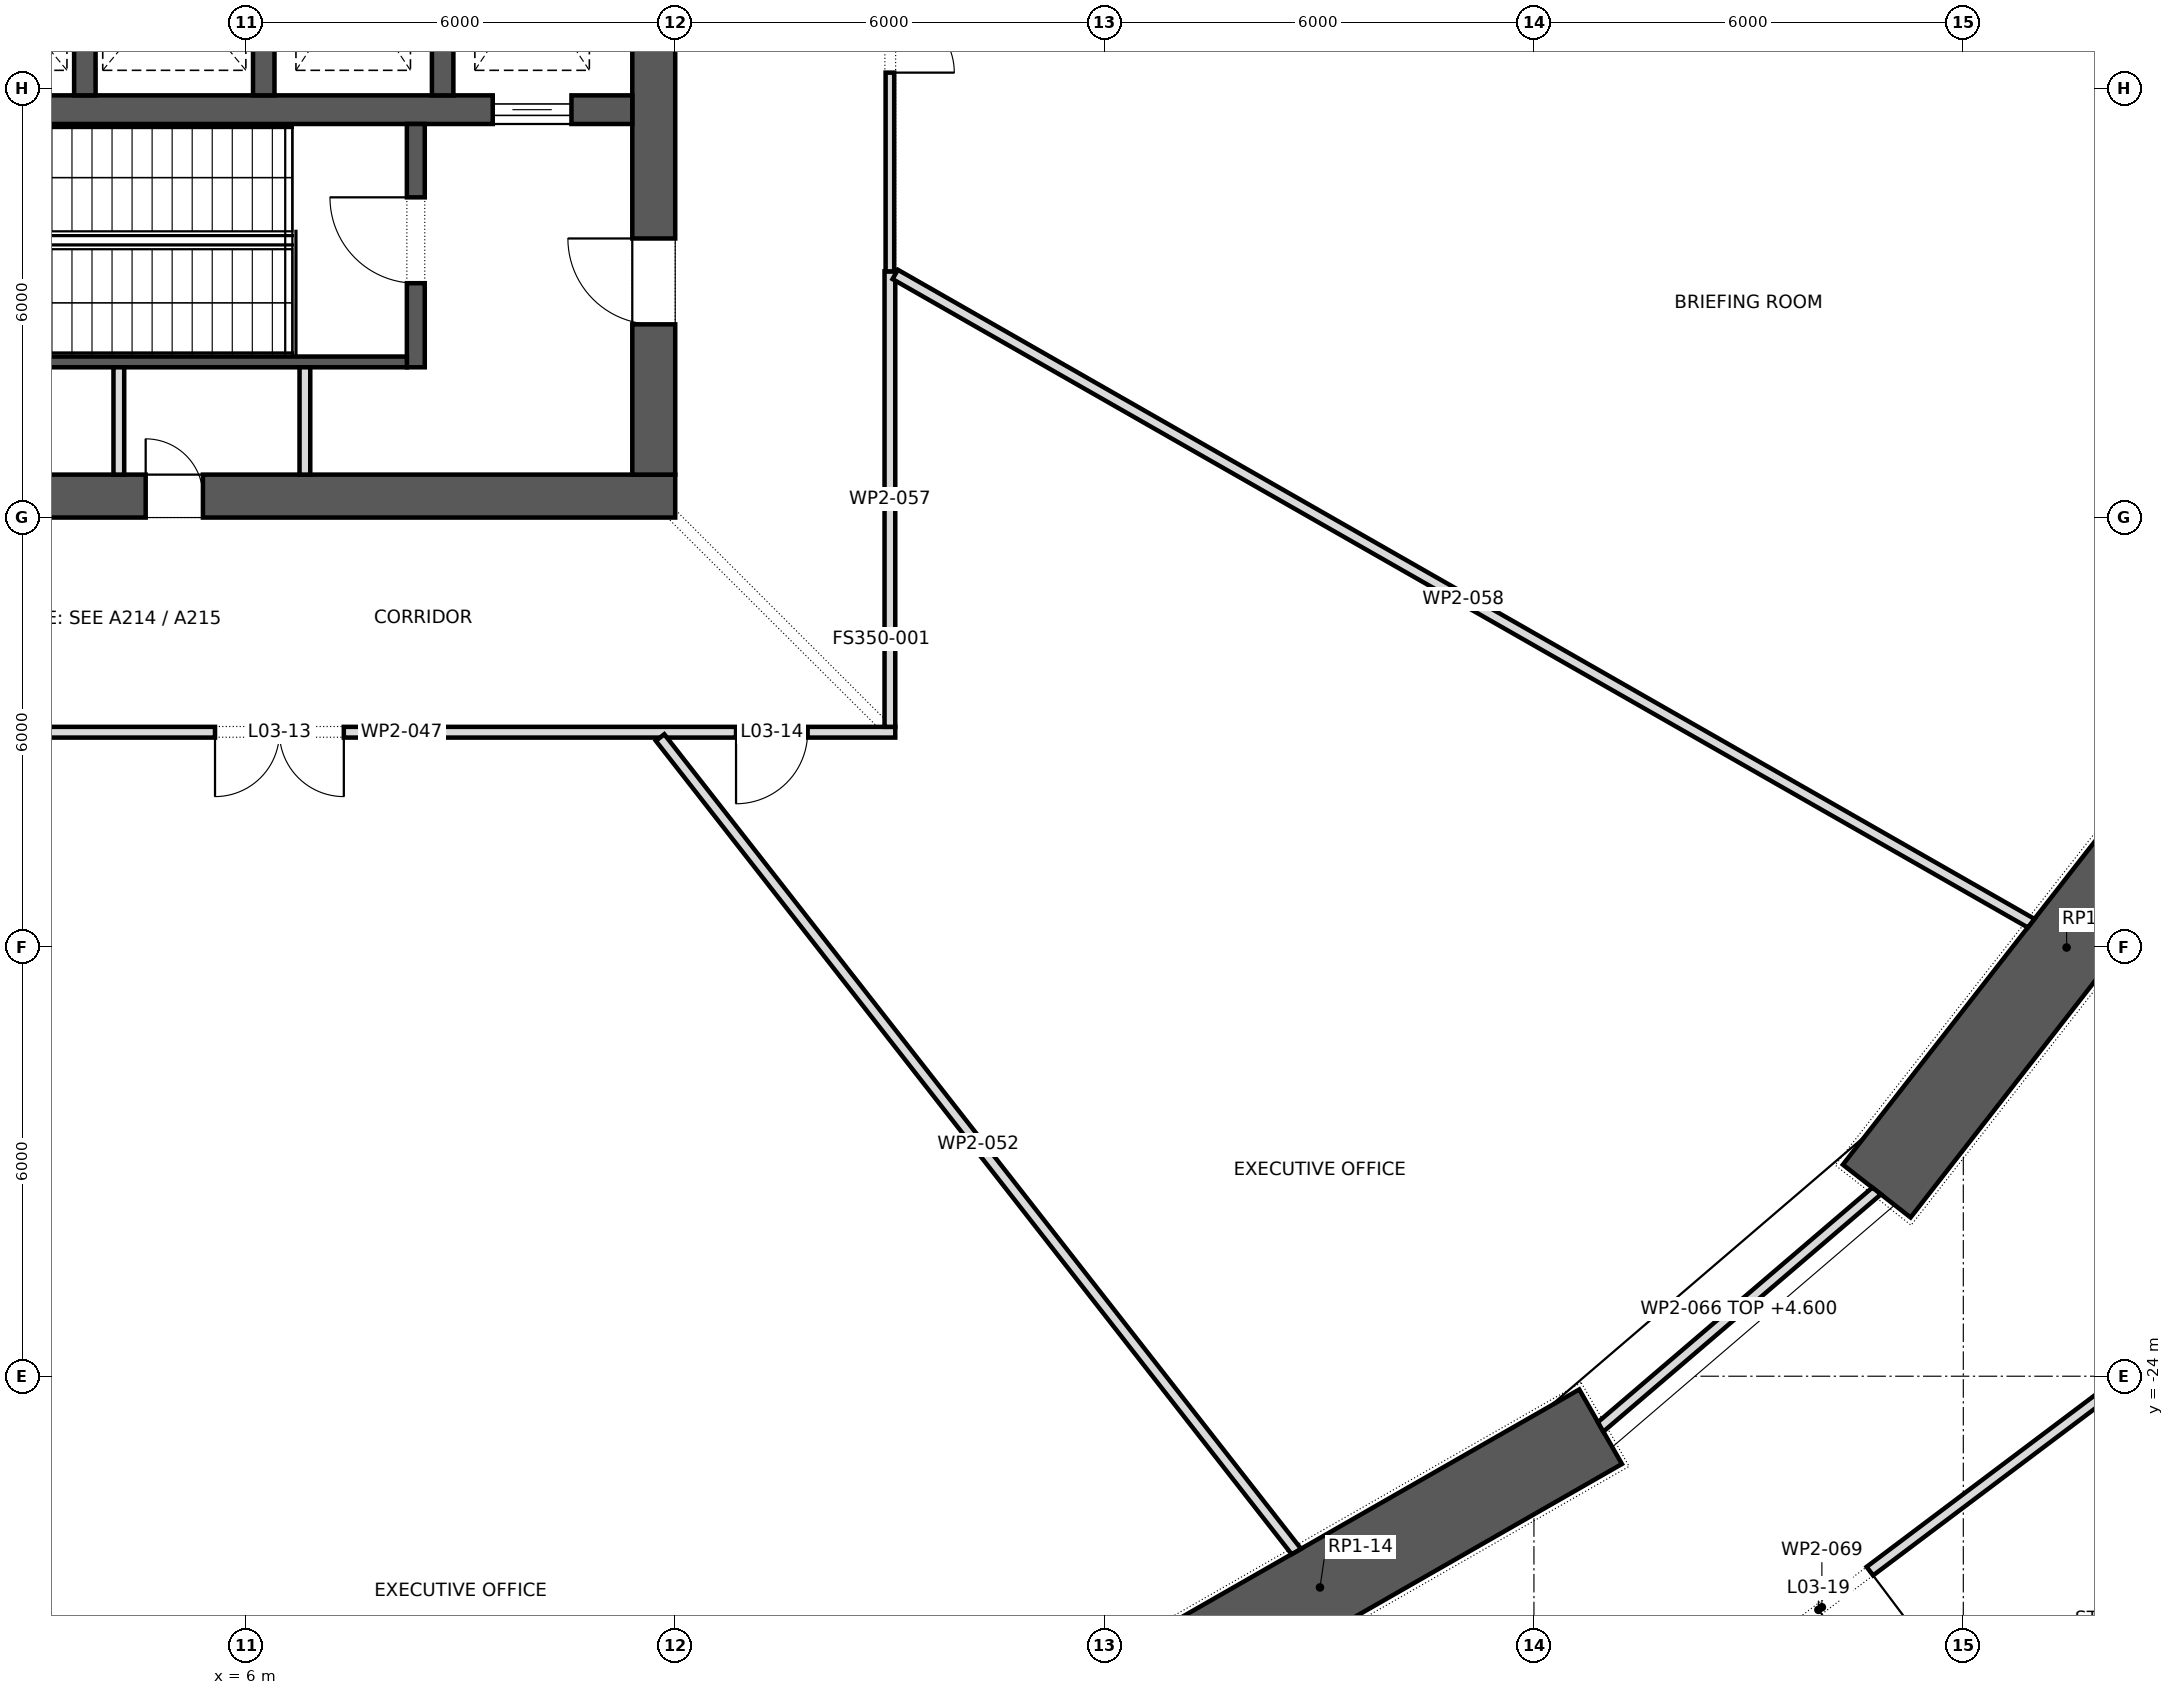
"""IFC4 building model, lengths in metres.
Left out: names, types, materials, properties, quantities, classifications, styles, units other than length and angle.
Written with IfcOpenShell. Run it as: python <this file> out.ifc"""

import sys

from ifc_helpers import new_model, si_unit, direction, frame, frame_2d, origin, place, context, subcontext, project, spatial, polyline, rectangle, outline, extrude, element, fill, save


model = new_model("IFC4")
c1 = context("Model", 3, precision=1e-05, world=origin(), true_north=direction((0.0, 1.0)))
c2 = subcontext(c1, "Body", "Model", "MODEL_VIEW")
j1 = project(units=[si_unit("LENGTHUNIT", "METRE"), si_unit("PLANEANGLEUNIT", "RADIAN")], contexts=[c1])
p1 = place(None, origin())
s1 = spatial("IfcSite", under=j1, at=p1, CompositionType="ELEMENT")
p2 = place(p1, origin())
s2 = spatial("IfcBuilding", under=s1, at=p2, CompositionType="ELEMENT")
p3 = place(p2, frame((0.0, 0.0, 18.0)))
s3 = spatial("IfcBuildingStorey", under=s2, at=p3, CompositionType="ELEMENT", Elevation=18.0)
p4 = place(p3, frame((17.089, -29.198, 0.0), z_axis=(0.0, 0.0, 1.0), x_axis=(0.867760656864, 0.496982336103, 0.0)))
e1 = element("IfcWall", 1, at=p4, inside=s3, PredefinedType="SHEAR", context=c2, shape_type="SweptSolid", body=[
    extrude(rectangle(XDim=9.038, YDim=1.2, at=frame_2d((4.519, 0.0))), origin(), (0.0, 0.0, 1.0), 5.5),
])
p5 = place(p3, frame((28.79, -21.412, 0.0), z_axis=(0.0, 0.0, 1.0), x_axis=(0.614825322247, 0.788663314174, 0.0)))
e2 = element("IfcWall", 2, at=p5, inside=s3, PredefinedType="SHEAR", context=c2, shape_type="SweptSolid", body=[
    extrude(rectangle(XDim=8.632, YDim=1.2, at=frame_2d((4.316, 0.0))), origin(), (0.0, 0.0, 1.0), 5.5),
])
p6 = place(p3, frame((-12.0, -11.7, 0.0), z_axis=(0.0, 0.0, 1.0), x_axis=(1.0, 0.0, 0.0)))
e3 = element("IfcWall", 3, at=p6, inside=s3, PredefinedType="SHEAR", context=c2, shape_type="SweptSolid", body=[
    extrude(rectangle(XDim=24.0, YDim=0.6, at=frame_2d((12.0, 0.0))), origin(), (0.0, 0.0, 1.0), 5.5),
])
p7 = place(p6, frame((9.275, 0.0, 0.0)))
e4 = element("IfcOpeningElement", 4, at=p7, cuts=e3, PredefinedType="OPENING", context=c2, shape_type="SweptSolid", body=[
    extrude(rectangle(XDim=0.9, YDim=2.1, at=frame_2d((0.45, 1.05))), frame((0.0, 0.312, 0.0), z_axis=(0.0, -1.0, 0.0), x_axis=(1.0, 0.0, 0.0)), (0.0, 0.0, 1.0), 0.624),
])
p8 = place(p6, frame((10.925, 0.0, 0.0)))
e5 = element("IfcOpeningElement", 5, at=p8, cuts=e3, PredefinedType="OPENING", context=c2, shape_type="SweptSolid", body=[
    extrude(rectangle(XDim=0.9, YDim=2.1, at=frame_2d((0.45, 1.05))), frame((0.0, 0.312, 0.0), z_axis=(0.0, -1.0, 0.0), x_axis=(1.0, 0.0, 0.0)), (0.0, 0.0, 1.0), 0.624),
])
p9 = place(p6, frame((4.2, 0.0, 0.0)))
e6 = element("IfcOpeningElement", 6, at=p9, cuts=e3, PredefinedType="OPENING", context=c2, shape_type="SweptSolid", body=[
    extrude(rectangle(XDim=0.8, YDim=2.1, at=frame_2d((0.4, 1.05))), frame((0.0, 0.312, 0.0), z_axis=(0.0, -1.0, 0.0), x_axis=(1.0, 0.0, 0.0)), (0.0, 0.0, 1.0), 0.624),
])
p10 = place(p6, frame((6.8, 0.0, 0.0)))
e7 = element("IfcOpeningElement", 7, at=p10, cuts=e3, PredefinedType="OPENING", context=c2, shape_type="SweptSolid", body=[
    extrude(rectangle(XDim=0.8, YDim=2.1, at=frame_2d((0.4, 1.05))), frame((0.0, 0.312, 0.0), z_axis=(0.0, -1.0, 0.0), x_axis=(1.0, 0.0, 0.0)), (0.0, 0.0, 1.0), 0.624),
])
p11 = place(p6, frame((13.8, 0.0, 0.0)))
e8 = element("IfcOpeningElement", 8, at=p11, cuts=e3, PredefinedType="OPENING", context=c2, shape_type="SweptSolid", body=[
    extrude(rectangle(XDim=0.8, YDim=2.1, at=frame_2d((0.4, 1.05))), frame((0.0, 0.312, 0.0), z_axis=(0.0, -1.0, 0.0), x_axis=(1.0, 0.0, 0.0)), (0.0, 0.0, 1.0), 0.624),
])
p12 = place(p6, frame((16.6, 0.0, 0.0)))
e9 = element("IfcOpeningElement", 9, at=p12, cuts=e3, PredefinedType="OPENING", context=c2, shape_type="SweptSolid", body=[
    extrude(rectangle(XDim=0.8, YDim=2.1, at=frame_2d((0.4, 1.05))), frame((0.0, 0.312, 0.0), z_axis=(0.0, -1.0, 0.0), x_axis=(1.0, 0.0, 0.0)), (0.0, 0.0, 1.0), 0.624),
])
p13 = place(p3, frame((11.7, -11.4, 0.0), z_axis=(0.0, 0.0, 1.0), x_axis=(0.0, 1.0, 0.0)))
e10 = element("IfcWall", 10, at=p13, inside=s3, PredefinedType="SHEAR", context=c2, shape_type="SweptSolid", body=[
    extrude(rectangle(XDim=22.8, YDim=0.6, at=frame_2d((11.4, 0.0))), origin(), (0.0, 0.0, 1.0), 5.5),
])
p14 = place(p13, frame((10.2, 0.0, 0.0)))
e11 = element("IfcOpeningElement", 11, at=p14, cuts=e10, PredefinedType="OPENING", context=c2, shape_type="SweptSolid", body=[
    extrude(rectangle(XDim=2.4, YDim=2.1, at=frame_2d((1.2, 1.05))), frame((0.0, 0.312, 0.0), z_axis=(0.0, -1.0, 0.0), x_axis=(1.0, 0.0, 0.0)), (0.0, 0.0, 1.0), 0.624),
])
p15 = place(p13, frame((19.5, 0.0, 0.0)))
e12 = element("IfcOpeningElement", 12, at=p15, cuts=e10, PredefinedType="OPENING", context=c2, shape_type="SweptSolid", body=[
    extrude(rectangle(XDim=1.2, YDim=2.1, at=frame_2d((0.6, 1.05))), frame((0.0, 0.312, 0.0), z_axis=(0.0, -1.0, 0.0), x_axis=(1.0, 0.0, 0.0)), (0.0, 0.0, 1.0), 0.624),
])
p16 = place(p13, frame((2.1, 0.0, 0.0)))
e13 = element("IfcOpeningElement", 13, at=p16, cuts=e10, PredefinedType="OPENING", context=c2, shape_type="SweptSolid", body=[
    extrude(rectangle(XDim=1.2, YDim=2.1, at=frame_2d((0.6, 1.05))), frame((0.0, 0.312, 0.0), z_axis=(0.0, -1.0, 0.0), x_axis=(1.0, 0.0, 0.0)), (0.0, 0.0, 1.0), 0.624),
])
p17 = place(p3, frame((-11.4, -6.3, 0.0), z_axis=(0.0, 0.0, 1.0), x_axis=(1.0, 0.0, 0.0)))
e14 = element("IfcWall", 14, at=p17, inside=s3, PredefinedType="SHEAR", context=c2, shape_type="SweptSolid", body=[
    extrude(rectangle(XDim=22.8, YDim=0.4, at=frame_2d((11.4, 0.0))), origin(), (0.0, 0.0, 1.0), 5.5),
])
p18 = place(p17, frame((20.85, 0.0, 0.0)))
e15 = element("IfcOpeningElement", 15, at=p18, cuts=e14, PredefinedType="OPENING", context=c2, shape_type="SweptSolid", body=[
    extrude(rectangle(XDim=1.1, YDim=2.1, at=frame_2d((0.55, 1.05))), frame((0.0, 0.212, 0.0), z_axis=(0.0, -1.0, 0.0), x_axis=(1.0, 0.0, 0.0)), (0.0, 0.0, 1.0), 0.424),
])
for number, where, z_axis, x_axis in (
    (16, (3.75, -6.1, 0.0), (0.0, 0.0, 1.0), (0.0, 1.0, 0.0)),
    (17, (6.25, -6.1, 0.0), (0.0, 0.0, 1.0), (0.0, 1.0, 0.0)),
    (18, (8.75, -6.1, 0.0), (0.0, 0.0, 1.0), (0.0, 1.0, 0.0)),
):
    element("IfcWall", number, at=place(p3, frame(where, z_axis=z_axis, x_axis=x_axis)), inside=s3, PredefinedType="SHEAR", context=c2, shape_type="SweptSolid", body=[
        extrude(rectangle(XDim=2.9, YDim=0.3, at=frame_2d((1.45, 0.0))), origin(), (0.0, 0.0, 1.0), 5.5),
    ])
p19 = place(p3, frame((8.375, -9.9, 0.0), z_axis=(0.0, 0.0, 1.0), x_axis=(0.0, 1.0, 0.0)))
e19 = element("IfcWall", 19, at=p19, inside=s3, PredefinedType="SHEAR", context=c2, shape_type="SweptSolid", body=[
    extrude(rectangle(XDim=3.4, YDim=0.25, at=frame_2d((1.7, 0.0))), origin(), (0.0, 0.0, 1.0), 5.2),
])
p20 = place(p19, frame((1.175, 0.0, 0.0)))
e20 = element("IfcOpeningElement", 20, at=p20, cuts=e19, PredefinedType="OPENING", context=c2, shape_type="SweptSolid", body=[
    extrude(rectangle(XDim=1.2, YDim=2.1, at=frame_2d((0.6, 1.05))), frame((0.0, 0.137, 0.0), z_axis=(0.0, -1.0, 0.0), x_axis=(1.0, 0.0, 0.0)), (0.0, 0.0, 1.0), 0.274),
])
p21 = place(p3, frame((0.25, -9.825, 0.0), z_axis=(0.0, 0.0, 1.0), x_axis=(1.0, 0.0, 0.0)))
e21 = element("IfcWall", 21, at=p21, inside=s3, PredefinedType="SHEAR", context=c2, shape_type="SweptSolid", body=[
    extrude(rectangle(XDim=8.0, YDim=0.15, at=frame_2d((4.0, 0.0))), origin(), (0.0, 0.0, 1.0), 5.2),
])
for number, where, z_axis, x_axis in (
    (22, (4.225, -11.4, 0.0), (0.0, 0.0, 1.0), (0.0, 1.0, 0.0)),
    (23, (6.825, -11.4, 0.0), (0.0, 0.0, 1.0), (0.0, 1.0, 0.0)),
):
    element("IfcWall", number, at=place(p3, frame(where, z_axis=z_axis, x_axis=x_axis)), inside=s3, PredefinedType="PARTITIONING", context=c2, shape_type="SweptSolid", body=[
        extrude(rectangle(XDim=1.5, YDim=0.15, at=frame_2d((0.75, 0.0))), origin(), (0.0, 0.0, 1.0), 5.2),
    ])
p22 = place(p3, frame((1.275, -15.0, 0.0), z_axis=(0.0, 0.0, 1.0), x_axis=(1.0, 0.0, 0.0)))
e24 = element("IfcWall", 24, at=p22, inside=s3, PredefinedType="PARTITIONING", context=c2, shape_type="SweptSolid", body=[
    extrude(rectangle(XDim=13.8, YDim=0.15, at=frame_2d((6.9, 0.0))), origin(), (0.0, 0.0, 1.0), 5.2),
])
p23 = place(p22, frame((4.294, 0.0, 0.0)))
e25 = element("IfcOpeningElement", 25, at=p23, cuts=e24, PredefinedType="OPENING", context=c2, shape_type="SweptSolid", body=[
    extrude(rectangle(XDim=1.8, YDim=2.1, at=frame_2d((0.9, 1.05))), frame((0.0, 0.087, 0.0), z_axis=(0.0, -1.0, 0.0), x_axis=(1.0, 0.0, 0.0)), (0.0, 0.0, 1.0), 0.174),
])
p24 = place(p22, frame((11.575, 0.0, 0.0)))
e26 = element("IfcOpeningElement", 26, at=p24, cuts=e24, PredefinedType="OPENING", context=c2, shape_type="SweptSolid", body=[
    extrude(rectangle(XDim=1.0, YDim=2.1, at=frame_2d((0.5, 1.05))), frame((0.0, 0.087, 0.0), z_axis=(0.0, -1.0, 0.0), x_axis=(1.0, 0.0, 0.0)), (0.0, 0.0, 1.0), 0.174),
])
p25 = place(p3, frame((11.788, -15.074, 0.0), z_axis=(0.0, 0.0, 1.0), x_axis=(0.615848120598, -0.787864894735, 0.0)))
e27 = element("IfcWall", 27, at=p25, inside=s3, PredefinedType="PARTITIONING", context=c2, shape_type="SweptSolid", body=[
    extrude(outline(polyline([(0.0, -0.075), (14.428, -0.075), (14.449, 0.075), (0.0, 0.075), (0.0, -0.075)])), origin(), (0.0, 0.0, 1.0), 5.2),
])
p26 = place(p3, frame((15.0, -8.559, 0.0), z_axis=(0.0, 0.0, 1.0), x_axis=(0.0, -1.0, 0.0)))
e28 = element("IfcWall", 28, at=p26, inside=s3, PredefinedType="PARTITIONING", context=c2, shape_type="SweptSolid", body=[
    extrude(rectangle(XDim=6.366, YDim=0.15, at=frame_2d((3.183, 0.0))), origin(), (0.0, 0.0, 1.0), 5.2),
])
p27 = place(p3, frame((15.074, -8.602, 0.0), z_axis=(0.0, 0.0, 1.0), x_axis=(0.868343386691, -0.495963469209, 0.0)))
e29 = element("IfcWall", 29, at=p27, inside=s3, PredefinedType="PARTITIONING", context=c2, shape_type="SweptSolid", body=[
    extrude(outline(polyline([(0.0, -0.075), (18.271, -0.075), (18.292, 0.075), (0.0, 0.075), (0.0, -0.075)])), origin(), (0.0, 0.0, 1.0), 5.2),
])
p28 = place(p3, frame((15.0, -1.14, 0.0), z_axis=(0.0, 0.0, 1.0), x_axis=(0.0, -1.0, 0.0)))
e30 = element("IfcWall", 30, at=p28, inside=s3, PredefinedType="PARTITIONING", context=c2, shape_type="SweptSolid", body=[
    extrude(rectangle(XDim=7.42, YDim=0.12, at=frame_2d((3.71, 0.0))), origin(), (0.0, 0.0, 1.0), 5.2),
])
p29 = place(p28, frame((2.842, 0.0, 0.0)))
e31 = element("IfcOpeningElement", 31, at=p29, cuts=e30, PredefinedType="OPENING", context=c2, shape_type="SweptSolid", body=[
    extrude(rectangle(XDim=1.8, YDim=2.1, at=frame_2d((0.9, 1.05))), frame((0.0, 0.072, 0.0), z_axis=(0.0, -1.0, 0.0), x_axis=(1.0, 0.0, 0.0)), (0.0, 0.0, 1.0), 0.144),
])
p30 = place(p3, frame((24.932, -24.708, 0.0), z_axis=(0.0, 0.0, 1.0), x_axis=(0.760084552743, 0.649824185978, 0.0)))
e32 = element("IfcWall", 32, at=p30, inside=s3, PredefinedType="PARTITIONING", context=c2, shape_type="SweptSolid", body=[
    extrude(outline(polyline([(-0.014, -0.075), (5.09, -0.075), (5.06, 0.075), (0.014, 0.075), (-0.014, -0.075)])), origin(), (0.0, 0.0, 1.0), 4.6),
])
p31 = place(p3, frame((32.186, -24.098, 0.0), z_axis=(0.0, 0.0, 1.0), x_axis=(-0.799200559321, -0.601064444116, 0.0)))
e33 = element("IfcWall", 33, at=p31, inside=s3, PredefinedType="PARTITIONING", context=c2, shape_type="SweptSolid", body=[
    extrude(rectangle(XDim=10.417, YDim=0.15, at=frame_2d((5.208, 0.0))), origin(), (0.0, 0.0, 1.0), 5.2),
])
p32 = place(p31, frame((4.369, 0.0, 0.0)))
e34 = element("IfcOpeningElement", 34, at=p32, cuts=e33, PredefinedType="OPENING", context=c2, shape_type="SweptSolid", body=[
    extrude(rectangle(XDim=1.8, YDim=2.1, at=frame_2d((0.9, 1.05))), frame((0.0, 0.087, 0.0), z_axis=(0.0, -1.0, 0.0), x_axis=(1.0, 0.0, 0.0)), (0.0, 0.0, 1.0), 0.174),
])
p33 = place(p18, origin())
e35 = element("IfcDoor", 35, at=p33, inside=s3, OperationType="SLIDING_TO_LEFT", PredefinedType="DOOR", context=c2, shape_type="SweptSolid", body=[
    extrude(rectangle(XDim=1.1, YDim=2.1, at=frame_2d((0.55, 1.05))), frame((0.0, 0.025, 0.0), z_axis=(0.0, -1.0, 0.0), x_axis=(1.0, 0.0, 0.0)), (0.0, 0.0, 1.0), 0.05),
])
fill(e15, e35)
p34 = place(p20, origin())
e36 = element("IfcDoor", 36, at=p34, inside=s3, OperationType="SINGLE_SWING_LEFT", PredefinedType="DOOR", context=c2, shape_type="SweptSolid", body=[
    extrude(rectangle(XDim=1.2, YDim=2.1, at=frame_2d((0.6, 1.05))), frame((0.0, 0.025, 0.0), z_axis=(0.0, -1.0, 0.0), x_axis=(1.0, 0.0, 0.0)), (0.0, 0.0, 1.0), 0.05),
])
fill(e20, e36)
p35 = place(p16, origin())
e37 = element("IfcDoor", 37, at=p35, inside=s3, OperationType="SINGLE_SWING_LEFT", PredefinedType="DOOR", context=c2, shape_type="SweptSolid", body=[
    extrude(rectangle(XDim=1.2, YDim=2.1, at=frame_2d((0.6, 1.05))), frame((0.0, 0.025, 0.0), z_axis=(0.0, -1.0, 0.0), x_axis=(1.0, 0.0, 0.0)), (0.0, 0.0, 1.0), 0.05),
])
fill(e13, e37)
p36 = place(p12, origin())
e38 = element("IfcDoor", 38, at=p36, inside=s3, OperationType="SINGLE_SWING_RIGHT", PredefinedType="DOOR", context=c2, shape_type="SweptSolid", body=[
    extrude(rectangle(XDim=0.8, YDim=2.1, at=frame_2d((0.4, 1.05))), frame((0.0, 0.025, 0.0), z_axis=(0.0, -1.0, 0.0), x_axis=(1.0, 0.0, 0.0)), (0.0, 0.0, 1.0), 0.05),
])
fill(e9, e38)
p37 = place(p23, frame((1.8, 0.0, 0.0), z_axis=(0.0, 0.0, 1.0), x_axis=(-1.0, 0.0, 0.0)))
e39 = element("IfcDoor", 39, at=p37, inside=s3, OperationType="DOUBLE_DOOR_SINGLE_SWING", PredefinedType="DOOR", context=c2, shape_type="SweptSolid", body=[
    extrude(rectangle(XDim=1.8, YDim=2.1, at=frame_2d((0.9, 1.05))), frame((0.0, 0.025, 0.0), z_axis=(0.0, -1.0, 0.0), x_axis=(1.0, 0.0, 0.0)), (0.0, 0.0, 1.0), 0.05),
])
fill(e25, e39)
p38 = place(p24, frame((1.0, 0.0, 0.0), z_axis=(0.0, 0.0, 1.0), x_axis=(-1.0, 0.0, 0.0)))
e40 = element("IfcDoor", 40, at=p38, inside=s3, OperationType="SINGLE_SWING_LEFT", PredefinedType="DOOR", context=c2, shape_type="SweptSolid", body=[
    extrude(rectangle(XDim=1.0, YDim=2.1, at=frame_2d((0.5, 1.05))), frame((0.0, 0.025, 0.0), z_axis=(0.0, -1.0, 0.0), x_axis=(1.0, 0.0, 0.0)), (0.0, 0.0, 1.0), 0.05),
])
fill(e26, e40)
p39 = place(p29, origin())
e41 = element("IfcDoor", 41, at=p39, inside=s3, OperationType="DOUBLE_DOOR_SINGLE_SWING", PredefinedType="DOOR", context=c2, shape_type="SweptSolid", body=[
    extrude(rectangle(XDim=1.8, YDim=2.1, at=frame_2d((0.9, 1.05))), frame((0.0, 0.025, 0.0), z_axis=(0.0, -1.0, 0.0), x_axis=(1.0, 0.0, 0.0)), (0.0, 0.0, 1.0), 0.05),
])
fill(e31, e41)
p40 = place(p32, origin())
e42 = element("IfcDoor", 42, at=p40, inside=s3, OperationType="DOUBLE_DOOR_SINGLE_SWING", PredefinedType="DOOR", context=c2, shape_type="SweptSolid", body=[
    extrude(rectangle(XDim=1.8, YDim=2.1, at=frame_2d((0.9, 1.05))), frame((0.0, 0.025, 0.0), z_axis=(0.0, -1.0, 0.0), x_axis=(1.0, 0.0, 0.0)), (0.0, 0.0, 1.0), 0.05),
])
fill(e34, e42)
save(model, sys.argv[1])
